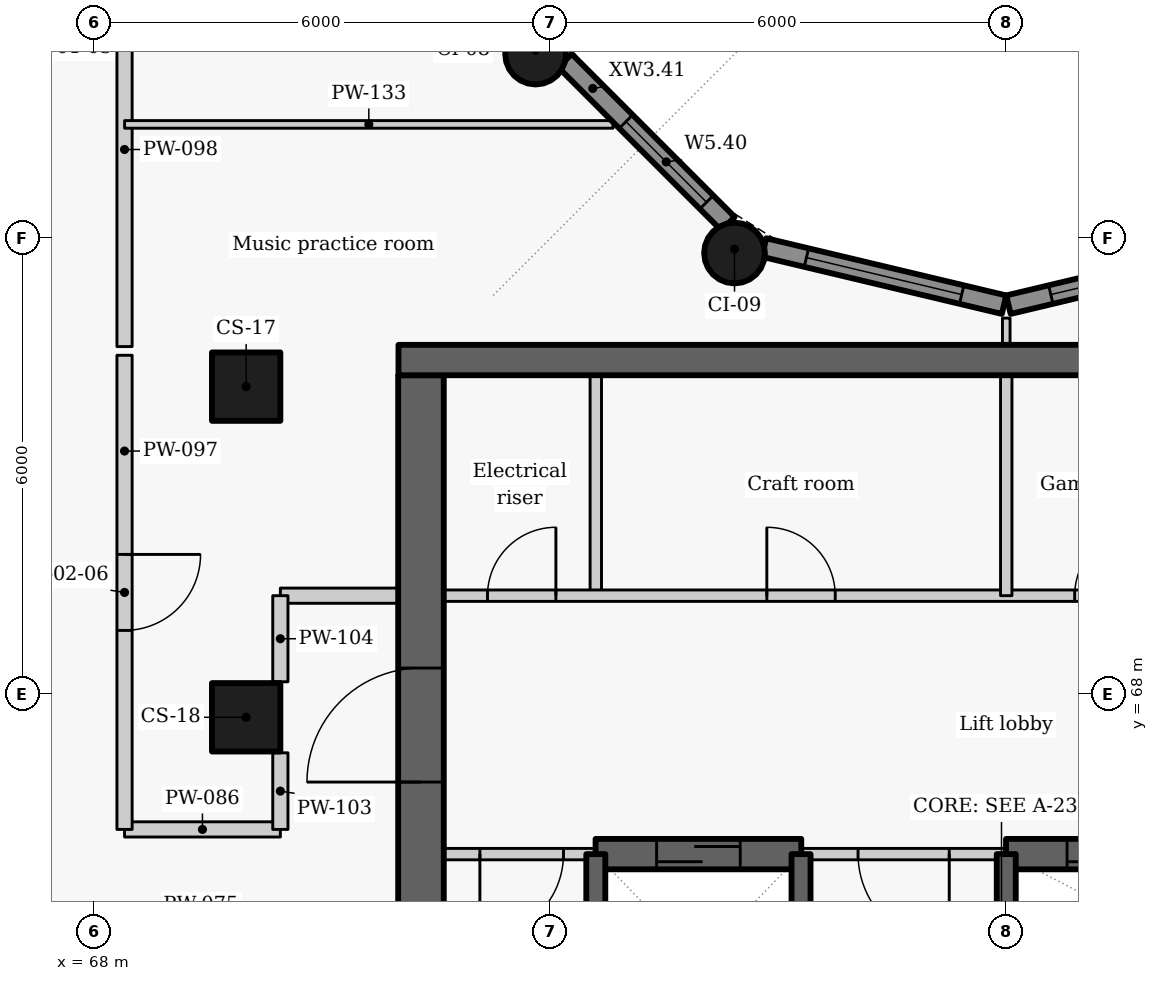
"""IFC4 building model, lengths in metres.
Left out: names, types, materials, properties, quantities, classifications, styles, units other than length and angle.
Written with IfcOpenShell. Run it as: python <this file> out.ifc"""

import sys

from ifc_helpers import new_model, si_unit, direction, frame, frame_2d, origin, origin_2d, place, context, subcontext, project, spatial, rectangle, circle, extrude, element, fill, save


model = new_model("IFC4")
c1 = context("Model", 3, precision=1e-05, world=origin(), true_north=direction((0.0, 1.0)))
c2 = subcontext(c1, "Body", "Model", "MODEL_VIEW")
j1 = project(units=[si_unit("LENGTHUNIT", "METRE"), si_unit("PLANEANGLEUNIT", "RADIAN")], contexts=[c1])
p1 = place(None, origin())
s1 = spatial("IfcSite", under=j1, at=p1, CompositionType="ELEMENT")
p2 = place(p1, origin())
s2 = spatial("IfcBuilding", under=s1, at=p2, CompositionType="ELEMENT")
p3 = place(p2, frame((0.0, 0.0, 193.2)))
s3 = spatial("IfcBuildingStorey", under=s2, at=p3, CompositionType="ELEMENT", Elevation=193.2)
for number, where, z_axis, x_axis in (
    (1, (70.0, 72.05, 0.0), (0.0, 0.0, 1.0), (0.0, -1.0, 0.0)),
    (2, (70.0, 67.7, 0.0), (0.0, 0.0, 1.0), (0.0, -1.0, 0.0)),
):
    element("IfcColumn", number, at=place(p3, frame(where, z_axis=z_axis, x_axis=x_axis)), inside=s3, PredefinedType="COLUMN", context=c2, shape_type="SweptSolid", body=[
        extrude(rectangle(XDim=0.9, YDim=0.9, at=origin_2d()), origin(), (0.0, 0.0, 1.0), 3.3),
    ])
for number, where, z_axis, x_axis in (
    (3, (73.808, 76.425, 0.0), (0.0, 0.0, 1.0), (0.5, -0.866, 0.0)),
    (4, (76.425, 73.808, 0.0), (0.0, 0.0, 1.0), (0.866, -0.5, 0.0)),
):
    element("IfcColumn", number, at=place(p3, frame(where, z_axis=z_axis, x_axis=x_axis)), inside=s3, PredefinedType="COLUMN", context=c2, shape_type="SweptSolid", body=[
        extrude(circle(Radius=0.4, at=origin_2d()), origin(), (0.0, 0.0, 1.0), 3.3),
    ])
p4 = place(p3, frame((83.186, 73.881, 0.0), z_axis=(0.0, 0.0, 1.0), x_axis=(-0.972773113459, -0.231759508395, 0.0)))
e5 = element("IfcWall", 5, at=p4, inside=s3, PredefinedType="SOLIDWALL", context=c2, shape_type="SweptSolid", body=[
    extrude(rectangle(XDim=3.246, YDim=0.25, at=frame_2d((1.623, 0.0))), origin(), (0.0, 0.0, 1.0), 2.425),
])
p5 = place(p4, frame((0.573, 0.0, 0.9)))
e6 = element("IfcOpeningElement", 6, at=p5, cuts=e5, PredefinedType="OPENING", context=c2, shape_type="SweptSolid", body=[
    extrude(rectangle(XDim=2.1, YDim=1.1, at=frame_2d((1.05, 0.55))), frame((0.0, 0.135, 0.0), z_axis=(0.0, -1.0, 0.0), x_axis=(1.0, 0.0, 0.0)), (0.0, 0.0, 1.0), 0.27),
])
p6 = place(p3, frame((79.971, 73.128, 0.0), z_axis=(0.0, 0.0, 1.0), x_axis=(-0.972773113459, 0.231759508395, 0.0)))
e7 = element("IfcWall", 7, at=p6, inside=s3, PredefinedType="SOLIDWALL", context=c2, shape_type="SweptSolid", body=[
    extrude(rectangle(XDim=3.246, YDim=0.25, at=frame_2d((1.623, 0.0))), origin(), (0.0, 0.0, 1.0), 2.425),
])
p7 = place(p6, frame((0.573, 0.0, 0.9)))
e8 = element("IfcOpeningElement", 8, at=p7, cuts=e7, PredefinedType="OPENING", context=c2, shape_type="SweptSolid", body=[
    extrude(rectangle(XDim=2.1, YDim=1.1, at=frame_2d((1.05, 0.55))), frame((0.0, 0.135, 0.0), z_axis=(0.0, -1.0, 0.0), x_axis=(1.0, 0.0, 0.0)), (0.0, 0.0, 1.0), 0.27),
])
p8 = place(p3, frame((76.339, 74.194, 0.0), z_axis=(0.0, 0.0, 1.0), x_axis=(-0.707106781187, 0.707106781187, 0.0)))
e9 = element("IfcWall", 9, at=p8, inside=s3, PredefinedType="SOLIDWALL", context=c2, shape_type="SweptSolid", body=[
    extrude(rectangle(XDim=3.033, YDim=0.25, at=frame_2d((1.517, 0.0))), origin(), (0.0, 0.0, 1.0), 2.425),
])
p9 = place(p8, frame((0.399, 0.0, 0.9)))
e10 = element("IfcOpeningElement", 10, at=p9, cuts=e9, PredefinedType="OPENING", context=c2, shape_type="SweptSolid", body=[
    extrude(rectangle(XDim=1.5, YDim=1.1, at=frame_2d((0.75, 0.55))), frame((0.0, 0.135, 0.0), z_axis=(0.0, -1.0, 0.0), x_axis=(1.0, 0.0, 0.0)), (0.0, 0.0, 1.0), 0.27),
])
p10 = place(p3, frame((74.6, 69.3, 0.0), z_axis=(0.0, 0.0, 1.0), x_axis=(0.0, 1.0, 0.0)))
e11 = element("IfcWall", 11, at=p10, inside=s3, PredefinedType="PARTITIONING", context=c2, shape_type="SweptSolid", body=[
    extrude(rectangle(XDim=2.9, YDim=0.15, at=frame_2d((1.45, 0.0))), origin(), (0.0, 0.0, 1.0), 3.025),
])
p11 = place(p3, frame((72.0, 69.3, 0.0), z_axis=(0.0, 0.0, 1.0), x_axis=(1.0, 0.0, 0.0)))
e12 = element("IfcWall", 12, at=p11, inside=s3, PredefinedType="PARTITIONING", context=c2, shape_type="SweptSolid", body=[
    extrude(rectangle(XDim=13.4, YDim=0.15, at=frame_2d((6.7, 0.0))), origin(), (0.0, 0.0, 1.0), 3.025),
])
p12 = place(p11, frame((1.175, 0.0, 0.0)))
e13 = element("IfcOpeningElement", 13, at=p12, cuts=e12, PredefinedType="OPENING", context=c2, shape_type="SweptSolid", body=[
    extrude(rectangle(XDim=0.9, YDim=2.1, at=frame_2d((0.45, 1.05))), frame((0.0, 0.085, 0.0), z_axis=(0.0, -1.0, 0.0), x_axis=(1.0, 0.0, 0.0)), (0.0, 0.0, 1.0), 0.17),
])
p13 = place(p11, frame((4.85, 0.0, 0.0)))
e14 = element("IfcOpeningElement", 14, at=p13, cuts=e12, PredefinedType="OPENING", context=c2, shape_type="SweptSolid", body=[
    extrude(rectangle(XDim=0.9, YDim=2.1, at=frame_2d((0.45, 1.05))), frame((0.0, 0.085, 0.0), z_axis=(0.0, -1.0, 0.0), x_axis=(1.0, 0.0, 0.0)), (0.0, 0.0, 1.0), 0.17),
])
p14 = place(p11, frame((8.9, 0.0, 0.0)))
e15 = element("IfcOpeningElement", 15, at=p14, cuts=e12, PredefinedType="OPENING", context=c2, shape_type="SweptSolid", body=[
    extrude(rectangle(XDim=0.9, YDim=2.1, at=frame_2d((0.45, 1.05))), frame((0.0, 0.085, 0.0), z_axis=(0.0, -1.0, 0.0), x_axis=(1.0, 0.0, 0.0)), (0.0, 0.0, 1.0), 0.17),
])
p15 = place(p11, frame((11.6, 0.0, 0.0)))
e16 = element("IfcOpeningElement", 16, at=p15, cuts=e12, PredefinedType="OPENING", context=c2, shape_type="SweptSolid", body=[
    extrude(rectangle(XDim=0.9, YDim=2.1, at=frame_2d((0.45, 1.05))), frame((0.0, 0.085, 0.0), z_axis=(0.0, -1.0, 0.0), x_axis=(1.0, 0.0, 0.0)), (0.0, 0.0, 1.0), 0.17),
])
p16 = place(p3, frame((72.3, 63.1, -0.275), z_axis=(0.0, 0.0, 1.0), x_axis=(0.0, 1.0, 0.0)))
e17 = element("IfcWall", 17, at=p16, inside=s3, PredefinedType="SHEAR", context=c2, shape_type="SweptSolid", body=[
    extrude(rectangle(XDim=9.1, YDim=0.6, at=frame_2d((4.55, 0.0))), origin(), (0.0, 0.0, 1.0), 3.3),
])
p17 = place(p16, frame((3.748, 0.0, 0.275)))
e18 = element("IfcOpeningElement", 18, at=p17, cuts=e17, PredefinedType="OPENING", context=c2, shape_type="SweptSolid", body=[
    extrude(rectangle(XDim=1.5, YDim=2.1, at=frame_2d((0.75, 1.05))), frame((0.0, 0.31, 0.0), z_axis=(0.0, -1.0, 0.0), x_axis=(1.0, 0.0, 0.0)), (0.0, 0.0, 1.0), 0.62),
])
p18 = place(p3, frame((80.0, 69.3, 0.0), z_axis=(0.0, 0.0, 1.0), x_axis=(0.0, 1.0, 0.0)))
e19 = element("IfcWall", 19, at=p18, inside=s3, PredefinedType="PARTITIONING", context=c2, shape_type="SweptSolid", body=[
    extrude(rectangle(XDim=2.9, YDim=0.15, at=frame_2d((1.45, 0.0))), origin(), (0.0, 0.0, 1.0), 3.025),
])
p19 = place(p3, frame((74.603, 65.9, 0.0), z_axis=(0.0, 0.0, 1.0), x_axis=(-1.0, 0.0, 0.0)))
e20 = element("IfcWall", 20, at=p19, inside=s3, PredefinedType="PARTITIONING", context=c2, shape_type="SweptSolid", body=[
    extrude(rectangle(XDim=2.603, YDim=0.15, at=frame_2d((1.302, 0.0))), origin(), (0.0, 0.0, 1.0), 3.025),
])
p20 = place(p19, frame((0.428, 0.0, 0.0)))
e21 = element("IfcOpeningElement", 21, at=p20, cuts=e20, PredefinedType="OPENING", context=c2, shape_type="SweptSolid", body=[
    extrude(rectangle(XDim=1.1, YDim=2.1, at=frame_2d((0.55, 1.05))), frame((0.0, 0.085, 0.0), z_axis=(0.0, -1.0, 0.0), x_axis=(1.0, 0.0, 0.0)), (0.0, 0.0, 1.0), 0.17),
])
p21 = place(p3, frame((80.003, 65.9, 0.0), z_axis=(0.0, 0.0, 1.0), x_axis=(-1.0, 0.0, 0.0)))
e22 = element("IfcWall", 22, at=p21, inside=s3, PredefinedType="PARTITIONING", context=c2, shape_type="SweptSolid", body=[
    extrude(rectangle(XDim=2.706, YDim=0.15, at=frame_2d((1.353, 0.0))), origin(), (0.0, 0.0, 1.0), 3.025),
])
p22 = place(p21, frame((0.753, 0.0, 0.0)))
e23 = element("IfcOpeningElement", 23, at=p22, cuts=e22, PredefinedType="OPENING", context=c2, shape_type="SweptSolid", body=[
    extrude(rectangle(XDim=1.2, YDim=2.1, at=frame_2d((0.6, 1.05))), frame((0.0, 0.085, 0.0), z_axis=(0.0, -1.0, 0.0), x_axis=(1.0, 0.0, 0.0)), (0.0, 0.0, 1.0), 0.17),
])
p23 = place(p3, frame((74.597, 65.9, -0.275), z_axis=(0.0, 0.0, 1.0), x_axis=(1.0, 0.0, 0.0)))
e24 = element("IfcWall", 24, at=p23, inside=s3, PredefinedType="SHEAR", context=c2, shape_type="SweptSolid", body=[
    extrude(rectangle(XDim=2.706, YDim=0.4, at=frame_2d((1.353, 0.0))), origin(), (0.0, 0.0, 1.0), 3.3),
])
p24 = place(p23, frame((0.803, 0.0, 0.275)))
e25 = element("IfcOpeningElement", 25, at=p24, cuts=e24, PredefinedType="OPENING", context=c2, shape_type="SweptSolid", body=[
    extrude(rectangle(XDim=1.1, YDim=2.1, at=frame_2d((0.55, 1.05))), frame((0.0, 0.21, 0.0), z_axis=(0.0, -1.0, 0.0), x_axis=(1.0, 0.0, 0.0)), (0.0, 0.0, 1.0), 0.42),
])
p25 = place(p3, frame((79.997, 65.9, -0.275), z_axis=(0.0, 0.0, 1.0), x_axis=(1.0, 0.0, 0.0)))
e26 = element("IfcWall", 26, at=p25, inside=s3, PredefinedType="SHEAR", context=c2, shape_type="SweptSolid", body=[
    extrude(rectangle(XDim=5.406, YDim=0.4, at=frame_2d((2.703, 0.0))), origin(), (0.0, 0.0, 1.0), 3.3),
])
p26 = place(p25, frame((0.803, 0.0, 0.275)))
e27 = element("IfcOpeningElement", 27, at=p26, cuts=e26, PredefinedType="OPENING", context=c2, shape_type="SweptSolid", body=[
    extrude(rectangle(XDim=1.1, YDim=2.1, at=frame_2d((0.55, 1.05))), frame((0.0, 0.21, 0.0), z_axis=(0.0, -1.0, 0.0), x_axis=(1.0, 0.0, 0.0)), (0.0, 0.0, 1.0), 0.42),
])
for number, where, z_axis, x_axis in (
    (28, (74.6, 63.1, -0.275), (0.0, 0.0, 1.0), (0.0, 1.0, 0.0)),
    (29, (77.3, 63.1, -0.275), (0.0, 0.0, 1.0), (0.0, 1.0, 0.0)),
    (30, (80.0, 63.1, -0.275), (0.0, 0.0, 1.0), (0.0, 1.0, 0.0)),
):
    element("IfcWall", number, at=place(p3, frame(where, z_axis=z_axis, x_axis=x_axis)), inside=s3, PredefinedType="SHEAR", context=c2, shape_type="SweptSolid", body=[
        extrude(rectangle(XDim=2.8, YDim=0.25, at=frame_2d((1.4, 0.0))), origin(), (0.0, 0.0, 1.0), 3.3),
    ])
p27 = place(p3, frame((70.45, 69.3, 0.0), z_axis=(0.0, 0.0, 1.0), x_axis=(1.0, 0.0, 0.0)))
e31 = element("IfcWall", 31, at=p27, inside=s3, PredefinedType="PARTITIONING", context=c2, shape_type="SweptSolid", body=[
    extrude(rectangle(XDim=1.55, YDim=0.2, at=frame_2d((0.775, 0.0))), origin(), (0.0, 0.0, 1.0), 3.025),
])
p28 = place(p3, frame((68.4, 66.225, 0.0), z_axis=(0.0, 0.0, 1.0), x_axis=(1.0, 0.0, 0.0)))
e32 = element("IfcWall", 32, at=p28, inside=s3, PredefinedType="PARTITIONING", context=c2, shape_type="SweptSolid", body=[
    extrude(rectangle(XDim=2.05, YDim=0.2, at=frame_2d((1.025, 0.0))), origin(), (0.0, 0.0, 1.0), 2.505),
])
p29 = place(p3, frame((68.4, 72.463, 0.0), z_axis=(0.0, 0.0, 1.0), x_axis=(0.0, -1.0, 0.0)))
e33 = element("IfcWall", 33, at=p29, inside=s3, PredefinedType="PARTITIONING", context=c2, shape_type="SweptSolid", body=[
    extrude(rectangle(XDim=6.238, YDim=0.2, at=frame_2d((3.119, 0.0))), origin(), (0.0, 0.0, 1.0), 3.025),
])
p30 = place(p29, frame((2.62, 0.0, 0.0)))
e34 = element("IfcOpeningElement", 34, at=p30, cuts=e33, PredefinedType="OPENING", context=c2, shape_type="SweptSolid", body=[
    extrude(rectangle(XDim=1.0, YDim=2.1, at=frame_2d((0.5, 1.05))), frame((0.0, 0.11, 0.0), z_axis=(0.0, -1.0, 0.0), x_axis=(1.0, 0.0, 0.0)), (0.0, 0.0, 1.0), 0.22),
])
p31 = place(p3, frame((68.4, 72.577, 0.0), z_axis=(0.0, 0.0, 1.0), x_axis=(0.0, 1.0, 0.0)))
e35 = element("IfcWall", 35, at=p31, inside=s3, PredefinedType="PARTITIONING", context=c2, shape_type="SweptSolid", body=[
    extrude(rectangle(XDim=5.186, YDim=0.2, at=frame_2d((2.593, 0.0))), origin(), (0.0, 0.0, 1.0), 3.025),
])
p32 = place(p3, frame((70.45, 66.225, 0.0), z_axis=(0.0, 0.0, 1.0), x_axis=(0.0, 1.0, 0.0)))
e36 = element("IfcWall", 36, at=p32, inside=s3, PredefinedType="PARTITIONING", context=c2, shape_type="SweptSolid", body=[
    extrude(rectangle(XDim=1.008, YDim=0.2, at=frame_2d((0.504, 0.0))), origin(), (0.0, 0.0, 1.0), 3.025),
])
p33 = place(p3, frame((70.45, 68.167, 0.0), z_axis=(0.0, 0.0, 1.0), x_axis=(0.0, 1.0, 0.0)))
e37 = element("IfcWall", 37, at=p33, inside=s3, PredefinedType="PARTITIONING", context=c2, shape_type="SweptSolid", body=[
    extrude(rectangle(XDim=1.133, YDim=0.2, at=frame_2d((0.566, 0.0))), origin(), (0.0, 0.0, 1.0), 3.025),
])
p34 = place(p3, frame((80.0, 72.6, 0.0), z_axis=(0.0, 0.0, 1.0), x_axis=(0.0, 1.0, 0.0)))
e38 = element("IfcWall", 38, at=p34, inside=s3, PredefinedType="PARTITIONING", context=c2, shape_type="SweptSolid", body=[
    extrude(rectangle(XDim=0.352, YDim=0.1, at=frame_2d((0.176, 0.0))), origin(), (0.0, 0.0, 1.0), 3.025),
])
p35 = place(p3, frame((68.401, 75.5, 0.0), z_axis=(0.0, 0.0, 1.0), x_axis=(1.0, 0.0, 0.0)))
e39 = element("IfcWall", 39, at=p35, inside=s3, PredefinedType="PARTITIONING", context=c2, shape_type="SweptSolid", body=[
    extrude(rectangle(XDim=6.426, YDim=0.1, at=frame_2d((3.213, 0.0))), origin(), (0.0, 0.0, 1.0), 2.505),
])
p36 = place(p3, frame((72.004, 72.4, -0.275), z_axis=(0.0, 0.0, 1.0), x_axis=(1.0, 0.0, 0.0)))
e40 = element("IfcWall", 40, at=p36, inside=s3, PredefinedType="SHEAR", context=c2, shape_type="SweptSolid", body=[
    extrude(rectangle(XDim=15.992, YDim=0.4, at=frame_2d((7.996, 0.0))), origin(), (0.0, 0.0, 1.0), 3.3),
])
p37 = place(p5, origin())
e41 = element("IfcWindow", 41, at=p37, inside=s3, PartitioningType="SINGLE_PANEL", PredefinedType="WINDOW", context=c2, shape_type="SweptSolid", body=[
    extrude(rectangle(XDim=2.1, YDim=1.1, at=frame_2d((1.05, 0.55))), frame((0.0, 0.03, 0.0), z_axis=(0.0, -1.0, 0.0), x_axis=(1.0, 0.0, 0.0)), (0.0, 0.0, 1.0), 0.06),
])
fill(e6, e41)
p38 = place(p7, origin())
e42 = element("IfcWindow", 42, at=p38, inside=s3, PartitioningType="SINGLE_PANEL", PredefinedType="WINDOW", context=c2, shape_type="SweptSolid", body=[
    extrude(rectangle(XDim=2.1, YDim=1.1, at=frame_2d((1.05, 0.55))), frame((0.0, 0.03, 0.0), z_axis=(0.0, -1.0, 0.0), x_axis=(1.0, 0.0, 0.0)), (0.0, 0.0, 1.0), 0.06),
])
fill(e8, e42)
p39 = place(p9, origin())
e43 = element("IfcWindow", 43, at=p39, inside=s3, PartitioningType="SINGLE_PANEL", PredefinedType="WINDOW", context=c2, shape_type="SweptSolid", body=[
    extrude(rectangle(XDim=1.5, YDim=1.1, at=frame_2d((0.75, 0.55))), frame((0.0, 0.03, 0.0), z_axis=(0.0, -1.0, 0.0), x_axis=(1.0, 0.0, 0.0)), (0.0, 0.0, 1.0), 0.06),
])
fill(e10, e43)
p40 = place(p12, origin())
e44 = element("IfcDoor", 44, at=p40, inside=s3, OperationType="SINGLE_SWING_RIGHT", PredefinedType="DOOR", context=c2, shape_type="SweptSolid", body=[
    extrude(rectangle(XDim=0.9, YDim=2.1, at=frame_2d((0.45, 1.05))), frame((0.0, 0.025, 0.0), z_axis=(0.0, -1.0, 0.0), x_axis=(1.0, 0.0, 0.0)), (0.0, 0.0, 1.0), 0.05),
])
fill(e13, e44)
p41 = place(p13, origin())
e45 = element("IfcDoor", 45, at=p41, inside=s3, OperationType="SINGLE_SWING_LEFT", PredefinedType="DOOR", context=c2, shape_type="SweptSolid", body=[
    extrude(rectangle(XDim=0.9, YDim=2.1, at=frame_2d((0.45, 1.05))), frame((0.0, 0.025, 0.0), z_axis=(0.0, -1.0, 0.0), x_axis=(1.0, 0.0, 0.0)), (0.0, 0.0, 1.0), 0.05),
])
fill(e14, e45)
p42 = place(p14, origin())
e46 = element("IfcDoor", 46, at=p42, inside=s3, OperationType="SINGLE_SWING_RIGHT", PredefinedType="DOOR", context=c2, shape_type="SweptSolid", body=[
    extrude(rectangle(XDim=0.9, YDim=2.1, at=frame_2d((0.45, 1.05))), frame((0.0, 0.025, 0.0), z_axis=(0.0, -1.0, 0.0), x_axis=(1.0, 0.0, 0.0)), (0.0, 0.0, 1.0), 0.05),
])
fill(e15, e46)
p43 = place(p20, origin())
e47 = element("IfcDoor", 47, at=p43, inside=s3, OperationType="SINGLE_SWING_RIGHT", PredefinedType="DOOR", context=c2, shape_type="SweptSolid", body=[
    extrude(rectangle(XDim=1.1, YDim=2.1, at=frame_2d((0.55, 1.05))), frame((0.0, 0.025, 0.0), z_axis=(0.0, -1.0, 0.0), x_axis=(1.0, 0.0, 0.0)), (0.0, 0.0, 1.0), 0.05),
])
fill(e21, e47)
p44 = place(p24, origin())
e48 = element("IfcDoor", 48, at=p44, inside=s3, OperationType="SLIDING_TO_LEFT", PredefinedType="DOOR", context=c2, shape_type="SweptSolid", body=[
    extrude(rectangle(XDim=1.1, YDim=2.1, at=frame_2d((0.55, 1.05))), frame((0.0, 0.025, 0.0), z_axis=(0.0, -1.0, 0.0), x_axis=(1.0, 0.0, 0.0)), (0.0, 0.0, 1.0), 0.05),
])
fill(e25, e48)
p45 = place(p22, origin())
e49 = element("IfcDoor", 49, at=p45, inside=s3, OperationType="DOUBLE_DOOR_SINGLE_SWING", PredefinedType="DOOR", context=c2, shape_type="SweptSolid", body=[
    extrude(rectangle(XDim=1.2, YDim=2.1, at=frame_2d((0.6, 1.05))), frame((0.0, 0.025, 0.0), z_axis=(0.0, -1.0, 0.0), x_axis=(1.0, 0.0, 0.0)), (0.0, 0.0, 1.0), 0.05),
])
fill(e23, e49)
p46 = place(p26, origin())
e50 = element("IfcDoor", 50, at=p46, inside=s3, OperationType="SLIDING_TO_LEFT", PredefinedType="DOOR", context=c2, shape_type="SweptSolid", body=[
    extrude(rectangle(XDim=1.1, YDim=2.1, at=frame_2d((0.55, 1.05))), frame((0.0, 0.025, 0.0), z_axis=(0.0, -1.0, 0.0), x_axis=(1.0, 0.0, 0.0)), (0.0, 0.0, 1.0), 0.05),
])
fill(e27, e50)
p47 = place(p30, origin())
e51 = element("IfcDoor", 51, at=p47, inside=s3, OperationType="SINGLE_SWING_LEFT", PredefinedType="DOOR", context=c2, shape_type="SweptSolid", body=[
    extrude(rectangle(XDim=1.0, YDim=2.1, at=frame_2d((0.5, 1.05))), frame((0.0, 0.025, 0.0), z_axis=(0.0, -1.0, 0.0), x_axis=(1.0, 0.0, 0.0)), (0.0, 0.0, 1.0), 0.05),
])
fill(e34, e51)
p48 = place(p17, origin())
e52 = element("IfcDoor", 52, at=p48, inside=s3, OperationType="DOUBLE_DOOR_SINGLE_SWING", PredefinedType="DOOR", context=c2, shape_type="SweptSolid", body=[
    extrude(rectangle(XDim=1.5, YDim=2.1, at=frame_2d((0.75, 1.05))), frame((0.0, 0.025, 0.0), z_axis=(0.0, -1.0, 0.0), x_axis=(1.0, 0.0, 0.0)), (0.0, 0.0, 1.0), 0.05),
])
fill(e18, e52)
save(model, sys.argv[1])
